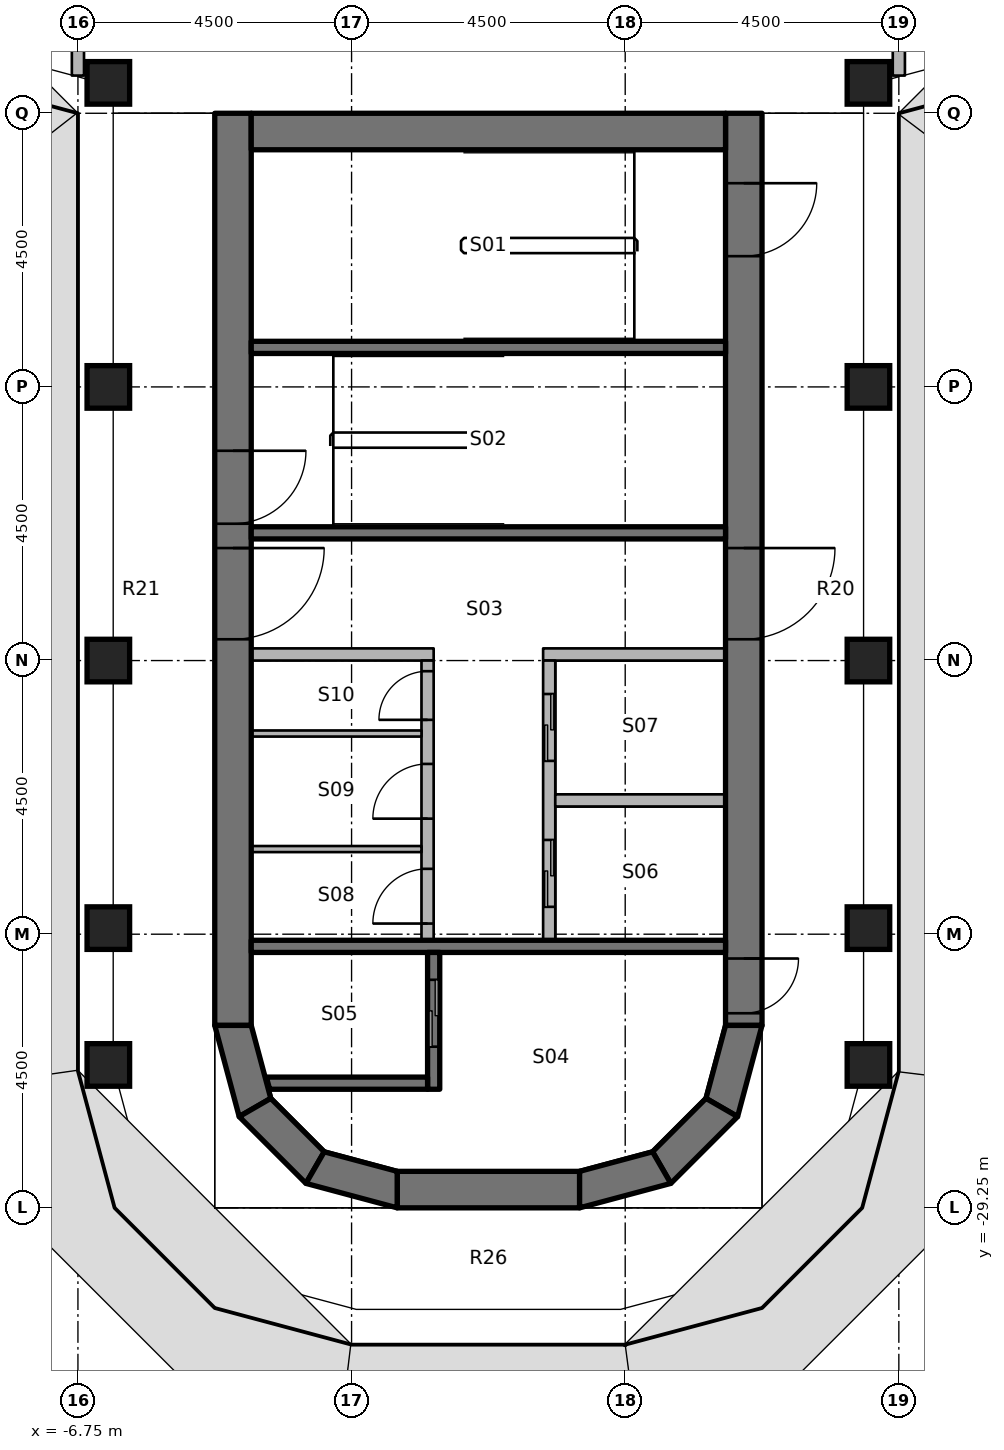
"""IFC4 building model, lengths in metres.
Left out: names, types, materials, properties, quantities, classifications, styles, units other than length and angle.
Written with IfcOpenShell. Run it as: python <this file> out.ifc"""

import sys

from ifc_helpers import new_model, si_unit, direction, frame, frame_2d, origin, origin_2d, place, context, subcontext, project, spatial, polyline, rectangle, outline, extrude, element, fill, save


model = new_model("IFC4")
c1 = context("Model", 3, precision=1e-05, world=origin(), true_north=direction((0.0, 1.0)))
c2 = subcontext(c1, "Body", "Model", "MODEL_VIEW")
j1 = project(units=[si_unit("LENGTHUNIT", "METRE"), si_unit("PLANEANGLEUNIT", "RADIAN")], contexts=[c1])
p1 = place(None, origin())
s1 = spatial("IfcSite", under=j1, at=p1, CompositionType="ELEMENT")
p2 = place(p1, origin())
s2 = spatial("IfcBuilding", under=s1, at=p2, CompositionType="ELEMENT")
p3 = place(p2, frame((0.0, 0.0, 195.4)))
s3 = spatial("IfcBuildingStorey", under=s2, at=p3, CompositionType="ELEMENT", Elevation=195.4)
for number, where, z_axis, x_axis in (
    (1, (-6.25, -26.9, 0.0), (0.0, 0.0, 1.0), (1.0, 0.0, 0.0)),
    (2, (-6.25, -24.65, 0.0), (0.0, 0.0, 1.0), (1.0, 0.0, 0.0)),
    (3, (-6.25, -20.25, 0.0), (0.0, 0.0, 1.0), (1.0, 0.0, 0.0)),
    (4, (-6.25, -15.75, 0.0), (0.0, 0.0, 1.0), (1.0, 0.0, 0.0)),
    (5, (-6.25, -10.75, 0.0), (0.0, 0.0, 1.0), (1.0, 0.0, 0.0)),
    (6, (6.25, -26.9, 0.0), (0.0, 0.0, 1.0), (1.0, 0.0, 0.0)),
    (7, (6.25, -24.65, 0.0), (0.0, 0.0, 1.0), (1.0, 0.0, 0.0)),
    (8, (6.25, -20.25, 0.0), (0.0, 0.0, 1.0), (1.0, 0.0, 0.0)),
    (9, (6.25, -15.75, 0.0), (0.0, 0.0, 1.0), (1.0, 0.0, 0.0)),
    (10, (6.25, -10.75, 0.0), (0.0, 0.0, 1.0), (1.0, 0.0, 0.0)),
):
    element("IfcColumn", number, at=place(p3, frame(where, z_axis=z_axis, x_axis=x_axis)), inside=s3, PredefinedType="COLUMN", context=c2, shape_type="SweptSolid", body=[
        extrude(rectangle(XDim=0.7, YDim=0.7, at=origin_2d()), origin(), (0.0, 0.0, 1.0), 3.65),
    ])
p4 = place(p3, frame((-4.2, -11.25, 0.0), z_axis=(0.0, 0.0, 1.0), x_axis=(0.0, -1.0, 0.0)))
e11 = element("IfcWall", 11, at=p4, inside=s3, PredefinedType="SHEAR", context=c2, shape_type="SweptSolid", body=[
    extrude(rectangle(XDim=15.0, YDim=0.6, at=frame_2d((7.5, 0.0))), origin(), (0.0, 0.0, 1.0), 3.8),
])
p5 = place(p4, frame((7.15, 0.0, 0.0)))
e12 = element("IfcOpeningElement", 12, at=p5, cuts=e11, PredefinedType="OPENING", context=c2, shape_type="SweptSolid", body=[
    extrude(rectangle(XDim=1.5, YDim=2.3, at=frame_2d((0.75, 1.15))), frame((0.0, 0.31, 0.0), z_axis=(0.0, -1.0, 0.0), x_axis=(1.0, 0.0, 0.0)), (0.0, 0.0, 1.0), 0.62),
])
p6 = place(p4, frame((5.55, 0.0, 0.0)))
e13 = element("IfcOpeningElement", 13, at=p6, cuts=e11, PredefinedType="OPENING", context=c2, shape_type="SweptSolid", body=[
    extrude(rectangle(XDim=1.2, YDim=2.1, at=frame_2d((0.6, 1.05))), frame((0.0, 0.31, 0.0), z_axis=(0.0, -1.0, 0.0), x_axis=(1.0, 0.0, 0.0)), (0.0, 0.0, 1.0), 0.62),
])
p7 = place(p3, frame((4.2, -11.25, 0.0), z_axis=(0.0, 0.0, 1.0), x_axis=(0.0, -1.0, 0.0)))
e14 = element("IfcWall", 14, at=p7, inside=s3, PredefinedType="SHEAR", context=c2, shape_type="SweptSolid", body=[
    extrude(rectangle(XDim=15.0, YDim=0.6, at=frame_2d((7.5, 0.0))), origin(), (0.0, 0.0, 1.0), 3.8),
])
p8 = place(p7, frame((7.15, 0.0, 0.0)))
e15 = element("IfcOpeningElement", 15, at=p8, cuts=e14, PredefinedType="OPENING", context=c2, shape_type="SweptSolid", body=[
    extrude(rectangle(XDim=1.5, YDim=2.3, at=frame_2d((0.75, 1.15))), frame((0.0, 0.31, 0.0), z_axis=(0.0, -1.0, 0.0), x_axis=(1.0, 0.0, 0.0)), (0.0, 0.0, 1.0), 0.62),
])
p9 = place(p7, frame((13.9, 0.0, 0.0)))
e16 = element("IfcOpeningElement", 16, at=p9, cuts=e14, PredefinedType="OPENING", context=c2, shape_type="SweptSolid", body=[
    extrude(rectangle(XDim=0.9, YDim=2.1, at=frame_2d((0.45, 1.05))), frame((0.0, 0.31, 0.0), z_axis=(0.0, -1.0, 0.0), x_axis=(1.0, 0.0, 0.0)), (0.0, 0.0, 1.0), 0.62),
])
p10 = place(p7, frame((1.15, 0.0, 0.0)))
e17 = element("IfcOpeningElement", 17, at=p10, cuts=e14, PredefinedType="OPENING", context=c2, shape_type="SweptSolid", body=[
    extrude(rectangle(XDim=1.2, YDim=2.1, at=frame_2d((0.6, 1.05))), frame((0.0, 0.31, 0.0), z_axis=(0.0, -1.0, 0.0), x_axis=(1.0, 0.0, 0.0)), (0.0, 0.0, 1.0), 0.62),
])
p11 = place(p3, frame((-3.9, -11.55, 0.0), z_axis=(0.0, 0.0, 1.0), x_axis=(1.0, 0.0, 0.0)))
e18 = element("IfcWall", 18, at=p11, inside=s3, PredefinedType="SHEAR", context=c2, shape_type="SweptSolid", body=[
    extrude(rectangle(XDim=7.8, YDim=0.6, at=frame_2d((3.9, 0.0))), origin(), (0.0, 0.0, 1.0), 3.8),
])
p12 = place(p3, frame((-1.5, -28.95, 0.0), z_axis=(0.0, 0.0, 1.0), x_axis=(1.0, 0.0, 0.0)))
e19 = element("IfcWall", 19, at=p12, inside=s3, PredefinedType="SHEAR", context=c2, shape_type="SweptSolid", body=[
    extrude(rectangle(XDim=3.0, YDim=0.6, at=frame_2d((1.5, 0.0))), origin(), (0.0, 0.0, 1.0), 3.8),
])
p13 = place(p3, origin())
e20 = element("IfcWall", 20, at=p13, inside=s3, PredefinedType="SHEAR", context=c2, shape_type="SweptSolid", body=[
    extrude(outline(polyline([(-4.5, -26.25), (-4.098, -27.75), (-3.579, -27.45), (-3.9, -26.25), (-4.5, -26.25)])), origin(), (0.0, 0.0, 1.0), 3.8),
])
p14 = place(p3, origin())
e21 = element("IfcWall", 21, at=p14, inside=s3, PredefinedType="SHEAR", context=c2, shape_type="SweptSolid", body=[
    extrude(outline(polyline([(-4.098, -27.75), (-3.0, -28.848), (-2.7, -28.329), (-3.579, -27.45), (-4.098, -27.75)])), origin(), (0.0, 0.0, 1.0), 3.8),
])
p15 = place(p3, origin())
e22 = element("IfcWall", 22, at=p15, inside=s3, PredefinedType="SHEAR", context=c2, shape_type="SweptSolid", body=[
    extrude(outline(polyline([(-3.0, -28.848), (-1.5, -29.25), (-1.5, -28.65), (-2.7, -28.329), (-3.0, -28.848)])), origin(), (0.0, 0.0, 1.0), 3.8),
])
p16 = place(p3, origin())
e23 = element("IfcWall", 23, at=p16, inside=s3, PredefinedType="SHEAR", context=c2, shape_type="SweptSolid", body=[
    extrude(outline(polyline([(4.5, -26.25), (4.098, -27.75), (3.579, -27.45), (3.9, -26.25), (4.5, -26.25)])), origin(), (0.0, 0.0, 1.0), 3.8),
])
p17 = place(p3, origin())
e24 = element("IfcWall", 24, at=p17, inside=s3, PredefinedType="SHEAR", context=c2, shape_type="SweptSolid", body=[
    extrude(outline(polyline([(4.098, -27.75), (3.0, -28.848), (2.7, -28.329), (3.579, -27.45), (4.098, -27.75)])), origin(), (0.0, 0.0, 1.0), 3.8),
])
p18 = place(p3, origin())
e25 = element("IfcWall", 25, at=p18, inside=s3, PredefinedType="SHEAR", context=c2, shape_type="SweptSolid", body=[
    extrude(outline(polyline([(3.0, -28.848), (1.5, -29.25), (1.5, -28.65), (2.7, -28.329), (3.0, -28.848)])), origin(), (0.0, 0.0, 1.0), 3.8),
])
p19 = place(p3, frame((3.9, -24.95, 0.0), z_axis=(0.0, 0.0, 1.0), x_axis=(-1.0, 0.0, 0.0)))
e26 = element("IfcWall", 26, at=p19, inside=s3, PredefinedType="SHEAR", context=c2, shape_type="SweptSolid", body=[
    extrude(rectangle(XDim=7.8, YDim=0.2, at=frame_2d((3.9, 0.0))), origin(), (0.0, 0.0, 1.0), 3.65),
])
p20 = place(p3, frame((-0.9, -27.3, 0.0), z_axis=(0.0, 0.0, 1.0), x_axis=(0.0, 1.0, 0.0)))
e27 = element("IfcWall", 27, at=p20, inside=s3, PredefinedType="SHEAR", context=c2, shape_type="SweptSolid", body=[
    extrude(rectangle(XDim=2.25, YDim=0.2, at=frame_2d((1.125, 0.0))), origin(), (0.0, 0.0, 1.0), 3.65),
])
p21 = place(p20, frame((0.7, 0.0, 0.0)))
e28 = element("IfcOpeningElement", 28, at=p21, cuts=e27, PredefinedType="OPENING", context=c2, shape_type="SweptSolid", body=[
    extrude(rectangle(XDim=1.1, YDim=2.3, at=frame_2d((0.55, 1.15))), frame((0.0, 0.11, 0.0), z_axis=(0.0, -1.0, 0.0), x_axis=(1.0, 0.0, 0.0)), (0.0, 0.0, 1.0), 0.22),
])
p22 = place(p3, origin())
e29 = element("IfcWall", 29, at=p22, inside=s3, PredefinedType="SHEAR", context=c2, shape_type="SweptSolid", body=[
    extrude(outline(polyline([(-1.0, -27.1), (-3.651, -27.1), (-3.597, -27.3), (-1.0, -27.3), (-1.0, -27.1)])), origin(), (0.0, 0.0, 1.0), 3.65),
])
for number, where, z_axis, x_axis in (
    (30, (3.9, -18.15, 0.0), (0.0, 0.0, 1.0), (-1.0, 0.0, 0.0)),
    (31, (3.9, -15.1, 0.0), (0.0, 0.0, 1.0), (-1.0, 0.0, 0.0)),
):
    element("IfcWall", number, at=place(p3, frame(where, z_axis=z_axis, x_axis=x_axis)), inside=s3, PredefinedType="SHEAR", context=c2, shape_type="SweptSolid", body=[
        extrude(rectangle(XDim=7.8, YDim=0.2, at=frame_2d((3.9, 0.0))), origin(), (0.0, 0.0, 1.0), 3.65),
    ])
p23 = place(p3, frame((3.9, -20.15, 0.0), z_axis=(0.0, 0.0, 1.0), x_axis=(-1.0, 0.0, 0.0)))
e32 = element("IfcWall", 32, at=p23, inside=s3, PredefinedType="PARTITIONING", context=c2, shape_type="SweptSolid", body=[
    extrude(rectangle(XDim=3.0, YDim=0.2, at=frame_2d((1.5, 0.0))), origin(), (0.0, 0.0, 1.0), 3.65),
])
p24 = place(p3, frame((1.0, -24.85, 0.0), z_axis=(0.0, 0.0, 1.0), x_axis=(0.0, 1.0, 0.0)))
e33 = element("IfcWall", 33, at=p24, inside=s3, PredefinedType="PARTITIONING", context=c2, shape_type="SweptSolid", body=[
    extrude(rectangle(XDim=4.6, YDim=0.2, at=frame_2d((2.3, 0.0))), origin(), (0.0, 0.0, 1.0), 3.65),
])
p25 = place(p24, frame((0.55, 0.0, 0.0)))
e34 = element("IfcOpeningElement", 34, at=p25, cuts=e33, PredefinedType="OPENING", context=c2, shape_type="SweptSolid", body=[
    extrude(rectangle(XDim=1.1, YDim=2.3, at=frame_2d((0.55, 1.15))), frame((0.0, 0.11, 0.0), z_axis=(0.0, -1.0, 0.0), x_axis=(1.0, 0.0, 0.0)), (0.0, 0.0, 1.0), 0.22),
])
p26 = place(p24, frame((2.95, 0.0, 0.0)))
e35 = element("IfcOpeningElement", 35, at=p26, cuts=e33, PredefinedType="OPENING", context=c2, shape_type="SweptSolid", body=[
    extrude(rectangle(XDim=1.1, YDim=2.3, at=frame_2d((0.55, 1.15))), frame((0.0, 0.11, 0.0), z_axis=(0.0, -1.0, 0.0), x_axis=(1.0, 0.0, 0.0)), (0.0, 0.0, 1.0), 0.22),
])
p27 = place(p3, frame((-0.9, -20.15, 0.0), z_axis=(0.0, 0.0, 1.0), x_axis=(-1.0, 0.0, 0.0)))
e36 = element("IfcWall", 36, at=p27, inside=s3, PredefinedType="PARTITIONING", context=c2, shape_type="SweptSolid", body=[
    extrude(rectangle(XDim=3.0, YDim=0.2, at=frame_2d((1.5, 0.0))), origin(), (0.0, 0.0, 1.0), 3.65),
])
p28 = place(p3, frame((-1.0, -24.85, 0.0), z_axis=(0.0, 0.0, 1.0), x_axis=(0.0, 1.0, 0.0)))
e37 = element("IfcWall", 37, at=p28, inside=s3, PredefinedType="PARTITIONING", context=c2, shape_type="SweptSolid", body=[
    extrude(rectangle(XDim=4.6, YDim=0.2, at=frame_2d((2.3, 0.0))), origin(), (0.0, 0.0, 1.0), 3.65),
])
p29 = place(p28, frame((0.275, 0.0, 0.0)))
e38 = element("IfcOpeningElement", 38, at=p29, cuts=e37, PredefinedType="OPENING", context=c2, shape_type="SweptSolid", body=[
    extrude(rectangle(XDim=0.9, YDim=2.1, at=frame_2d((0.45, 1.05))), frame((0.0, 0.11, 0.0), z_axis=(0.0, -1.0, 0.0), x_axis=(1.0, 0.0, 0.0)), (0.0, 0.0, 1.0), 0.22),
])
p30 = place(p28, frame((2.0, 0.0, 0.0)))
e39 = element("IfcOpeningElement", 39, at=p30, cuts=e37, PredefinedType="OPENING", context=c2, shape_type="SweptSolid", body=[
    extrude(rectangle(XDim=0.9, YDim=2.1, at=frame_2d((0.45, 1.05))), frame((0.0, 0.11, 0.0), z_axis=(0.0, -1.0, 0.0), x_axis=(1.0, 0.0, 0.0)), (0.0, 0.0, 1.0), 0.22),
])
p31 = place(p28, frame((3.625, 0.0, 0.0)))
e40 = element("IfcOpeningElement", 40, at=p31, cuts=e37, PredefinedType="OPENING", context=c2, shape_type="SweptSolid", body=[
    extrude(rectangle(XDim=0.8, YDim=2.1, at=frame_2d((0.4, 1.05))), frame((0.0, 0.11, 0.0), z_axis=(0.0, -1.0, 0.0), x_axis=(1.0, 0.0, 0.0)), (0.0, 0.0, 1.0), 0.22),
])
p32 = place(p3, frame((3.9, -22.55, 0.0), z_axis=(0.0, 0.0, 1.0), x_axis=(-1.0, 0.0, 0.0)))
e41 = element("IfcWall", 41, at=p32, inside=s3, PredefinedType="PARTITIONING", context=c2, shape_type="SweptSolid", body=[
    extrude(rectangle(XDim=2.8, YDim=0.2, at=frame_2d((1.4, 0.0))), origin(), (0.0, 0.0, 1.0), 3.65),
])
for number, where, z_axis, x_axis in (
    (42, (-1.1, -23.35, 0.0), (0.0, 0.0, 1.0), (-1.0, 0.0, 0.0)),
    (43, (-1.1, -21.45, 0.0), (0.0, 0.0, 1.0), (-1.0, 0.0, 0.0)),
):
    element("IfcWall", number, at=place(p3, frame(where, z_axis=z_axis, x_axis=x_axis)), inside=s3, PredefinedType="PARTITIONING", context=c2, shape_type="SweptSolid", body=[
        extrude(rectangle(XDim=2.8, YDim=0.1, at=frame_2d((1.4, 0.0))), origin(), (0.0, 0.0, 1.0), 3.65),
    ])
p33 = place(p3, frame((6.75, -6.85, 0.0), z_axis=(0.0, 0.0, 1.0), x_axis=(0.0, -1.0, 0.0)))
e44 = element("IfcWall", 44, at=p33, inside=s3, PredefinedType="PARTITIONING", context=c2, shape_type="SweptSolid", body=[
    extrude(rectangle(XDim=3.78, YDim=0.2, at=frame_2d((1.89, 0.0))), origin(), (0.0, 0.0, 1.0), 2.75),
])
p34 = place(p33, frame((1.44, 0.0, 0.0)))
e45 = element("IfcOpeningElement", 45, at=p34, cuts=e44, PredefinedType="OPENING", context=c2, shape_type="SweptSolid", body=[
    extrude(rectangle(XDim=0.9, YDim=2.1, at=frame_2d((0.45, 1.05))), frame((0.0, 0.11, 0.0), z_axis=(0.0, -1.0, 0.0), x_axis=(1.0, 0.0, 0.0)), (0.0, 0.0, 1.0), 0.22),
])
p35 = place(p3, frame((-6.75, -10.63, 0.0), z_axis=(0.0, 0.0, 1.0), x_axis=(0.0, 1.0, 0.0)))
e46 = element("IfcWall", 46, at=p35, inside=s3, PredefinedType="PARTITIONING", context=c2, shape_type="SweptSolid", body=[
    extrude(rectangle(XDim=3.78, YDim=0.2, at=frame_2d((1.89, 0.0))), origin(), (0.0, 0.0, 1.0), 2.75),
])
p36 = place(p8, origin())
e47 = element("IfcDoor", 47, at=p36, inside=s3, OperationType="DOUBLE_DOOR_SINGLE_SWING", PredefinedType="DOOR", context=c2, shape_type="SweptSolid", body=[
    extrude(rectangle(XDim=1.5, YDim=2.3, at=frame_2d((0.75, 1.15))), frame((0.0, 0.025, 0.0), z_axis=(0.0, -1.0, 0.0), x_axis=(1.0, 0.0, 0.0)), (0.0, 0.0, 1.0), 0.05),
])
fill(e15, e47)
p37 = place(p5, origin())
e48 = element("IfcDoor", 48, at=p37, inside=s3, OperationType="DOUBLE_DOOR_SINGLE_SWING", PredefinedType="DOOR", context=c2, shape_type="SweptSolid", body=[
    extrude(rectangle(XDim=1.5, YDim=2.3, at=frame_2d((0.75, 1.15))), frame((0.0, 0.025, 0.0), z_axis=(0.0, -1.0, 0.0), x_axis=(1.0, 0.0, 0.0)), (0.0, 0.0, 1.0), 0.05),
])
fill(e12, e48)
p38 = place(p9, origin())
e49 = element("IfcDoor", 49, at=p38, inside=s3, OperationType="SINGLE_SWING_LEFT", PredefinedType="DOOR", context=c2, shape_type="SweptSolid", body=[
    extrude(rectangle(XDim=0.9, YDim=2.1, at=frame_2d((0.45, 1.05))), frame((0.0, 0.025, 0.0), z_axis=(0.0, -1.0, 0.0), x_axis=(1.0, 0.0, 0.0)), (0.0, 0.0, 1.0), 0.05),
])
fill(e16, e49)
p39 = place(p6, origin())
e50 = element("IfcDoor", 50, at=p39, inside=s3, OperationType="SINGLE_SWING_LEFT", PredefinedType="DOOR", context=c2, shape_type="SweptSolid", body=[
    extrude(rectangle(XDim=1.2, YDim=2.1, at=frame_2d((0.6, 1.05))), frame((0.0, 0.025, 0.0), z_axis=(0.0, -1.0, 0.0), x_axis=(1.0, 0.0, 0.0)), (0.0, 0.0, 1.0), 0.05),
])
fill(e13, e50)
p40 = place(p10, origin())
e51 = element("IfcDoor", 51, at=p40, inside=s3, OperationType="SINGLE_SWING_LEFT", PredefinedType="DOOR", context=c2, shape_type="SweptSolid", body=[
    extrude(rectangle(XDim=1.2, YDim=2.1, at=frame_2d((0.6, 1.05))), frame((0.0, 0.025, 0.0), z_axis=(0.0, -1.0, 0.0), x_axis=(1.0, 0.0, 0.0)), (0.0, 0.0, 1.0), 0.05),
])
fill(e17, e51)
p41 = place(p21, origin())
e52 = element("IfcDoor", 52, at=p41, inside=s3, OperationType="DOUBLE_DOOR_SLIDING", PredefinedType="DOOR", context=c2, shape_type="SweptSolid", body=[
    extrude(rectangle(XDim=1.1, YDim=2.3, at=frame_2d((0.55, 1.15))), frame((0.0, 0.025, 0.0), z_axis=(0.0, -1.0, 0.0), x_axis=(1.0, 0.0, 0.0)), (0.0, 0.0, 1.0), 0.05),
])
fill(e28, e52)
p42 = place(p25, origin())
e53 = element("IfcDoor", 53, at=p42, inside=s3, OperationType="DOUBLE_DOOR_SLIDING", PredefinedType="DOOR", context=c2, shape_type="SweptSolid", body=[
    extrude(rectangle(XDim=1.1, YDim=2.3, at=frame_2d((0.55, 1.15))), frame((0.0, 0.025, 0.0), z_axis=(0.0, -1.0, 0.0), x_axis=(1.0, 0.0, 0.0)), (0.0, 0.0, 1.0), 0.05),
])
fill(e34, e53)
p43 = place(p26, origin())
e54 = element("IfcDoor", 54, at=p43, inside=s3, OperationType="DOUBLE_DOOR_SLIDING", PredefinedType="DOOR", context=c2, shape_type="SweptSolid", body=[
    extrude(rectangle(XDim=1.1, YDim=2.3, at=frame_2d((0.55, 1.15))), frame((0.0, 0.025, 0.0), z_axis=(0.0, -1.0, 0.0), x_axis=(1.0, 0.0, 0.0)), (0.0, 0.0, 1.0), 0.05),
])
fill(e35, e54)
p44 = place(p29, origin())
e55 = element("IfcDoor", 55, at=p44, inside=s3, OperationType="SINGLE_SWING_RIGHT", PredefinedType="DOOR", context=c2, shape_type="SweptSolid", body=[
    extrude(rectangle(XDim=0.9, YDim=2.1, at=frame_2d((0.45, 1.05))), frame((0.0, 0.025, 0.0), z_axis=(0.0, -1.0, 0.0), x_axis=(1.0, 0.0, 0.0)), (0.0, 0.0, 1.0), 0.05),
])
fill(e38, e55)
p45 = place(p30, origin())
e56 = element("IfcDoor", 56, at=p45, inside=s3, OperationType="SINGLE_SWING_RIGHT", PredefinedType="DOOR", context=c2, shape_type="SweptSolid", body=[
    extrude(rectangle(XDim=0.9, YDim=2.1, at=frame_2d((0.45, 1.05))), frame((0.0, 0.025, 0.0), z_axis=(0.0, -1.0, 0.0), x_axis=(1.0, 0.0, 0.0)), (0.0, 0.0, 1.0), 0.05),
])
fill(e39, e56)
p46 = place(p31, origin())
e57 = element("IfcDoor", 57, at=p46, inside=s3, OperationType="SINGLE_SWING_RIGHT", PredefinedType="DOOR", context=c2, shape_type="SweptSolid", body=[
    extrude(rectangle(XDim=0.8, YDim=2.1, at=frame_2d((0.4, 1.05))), frame((0.0, 0.025, 0.0), z_axis=(0.0, -1.0, 0.0), x_axis=(1.0, 0.0, 0.0)), (0.0, 0.0, 1.0), 0.05),
])
fill(e40, e57)
save(model, sys.argv[1])
